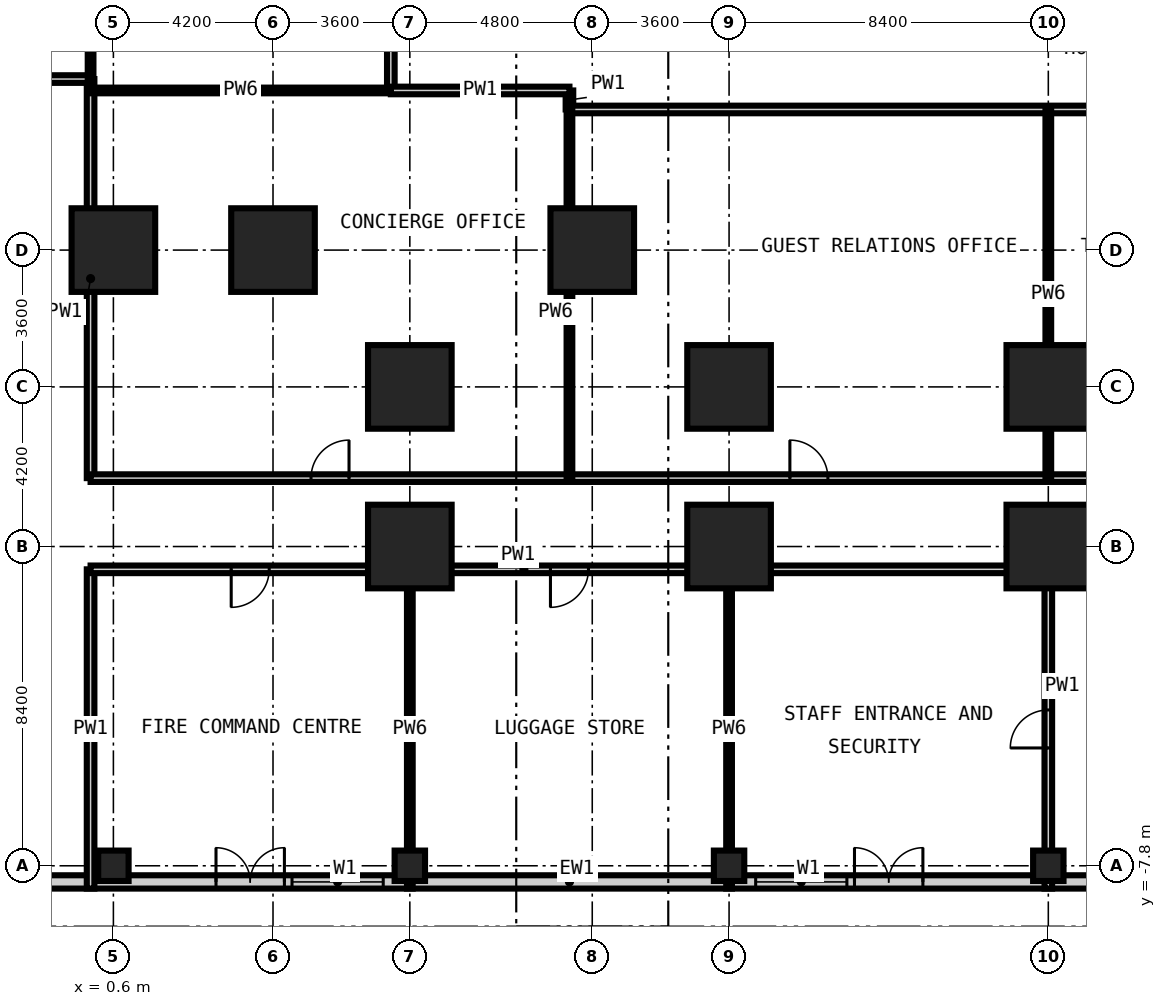
"""IFC4 building model, lengths in metres.
Left out: names, types, materials, properties, quantities, classifications, styles, units other than length and angle.
Written with IfcOpenShell. Run it as: python <this file> out.ifc"""

import sys

from ifc_helpers import new_model, si_unit, direction, frame, frame_2d, origin, origin_with_axes, origin_2d, place, context, subcontext, project, spatial, rectangle, extrude, element, fill, save


model = new_model("IFC4")
c1 = context("Model", 3, precision=1e-05, world=origin(), true_north=direction((0.0, 1.0)))
c2 = subcontext(c1, "Body", "Model", "MODEL_VIEW")
j1 = project(units=[si_unit("LENGTHUNIT", "METRE"), si_unit("PLANEANGLEUNIT", "RADIAN")], contexts=[c1])
p1 = place(None, origin())
s1 = spatial("IfcSite", under=j1, at=p1, CompositionType="ELEMENT")
p2 = place(p1, origin())
s2 = spatial("IfcBuilding", under=s1, at=p2, CompositionType="ELEMENT")
p3 = place(p2, origin())
s3 = spatial("IfcBuildingStorey", under=s2, at=p3, CompositionType="ELEMENT", Elevation=0.0)
for number, where, z_axis, x_axis in (
    (1, (0.6, 8.4, -0.3), (0.0, 0.0, 1.0), (1.0, 0.0, 0.0)),
    (2, (4.8, 8.4, -0.3), (0.0, 0.0, 1.0), (1.0, 0.0, 0.0)),
    (3, (8.4, 0.6, -0.3), (0.0, 0.0, 1.0), (1.0, 0.0, 0.0)),
    (4, (8.4, 4.8, -0.3), (0.0, 0.0, 1.0), (1.0, 0.0, 0.0)),
    (5, (13.2, 8.4, -0.3), (0.0, 0.0, 1.0), (1.0, 0.0, 0.0)),
    (6, (16.8, 0.6, -0.3), (0.0, 0.0, 1.0), (1.0, 0.0, 0.0)),
    (7, (16.8, 4.8, -0.3), (0.0, 0.0, 1.0), (1.0, 0.0, 0.0)),
    (8, (25.2, 0.6, -0.3), (0.0, 0.0, 1.0), (1.0, 0.0, 0.0)),
    (9, (25.2, 4.8, -0.3), (0.0, 0.0, 1.0), (1.0, 0.0, 0.0)),
):
    element("IfcColumn", number, at=place(p3, frame(where, z_axis=z_axis, x_axis=x_axis)), inside=s3, PredefinedType="COLUMN", context=c2, shape_type="SweptSolid", body=[
        extrude(rectangle(XDim=2.2, YDim=2.2, at=origin_2d()), origin(), (0.0, 0.0, 1.0), 6.0),
    ])
for number, where, z_axis, x_axis in (
    (10, (0.6, -7.8, -0.3), (0.0, 0.0, 1.0), (1.0, 0.0, 0.0)),
    (11, (8.4, -7.8, -0.3), (0.0, 0.0, 1.0), (1.0, 0.0, 0.0)),
    (12, (16.8, -7.8, -0.3), (0.0, 0.0, 1.0), (1.0, 0.0, 0.0)),
    (13, (25.2, -7.8, -0.3), (0.0, 0.0, 1.0), (1.0, 0.0, 0.0)),
):
    element("IfcColumn", number, at=place(p3, frame(where, z_axis=z_axis, x_axis=x_axis)), inside=s3, PredefinedType="COLUMN", context=c2, shape_type="SweptSolid", body=[
        extrude(rectangle(XDim=0.8, YDim=0.8, at=origin_2d()), origin(), (0.0, 0.0, 1.0), 6.0),
    ])
p4 = place(p3, frame((-33.6, -8.225, 0.0), z_axis=(0.0, 0.0, 1.0), x_axis=(1.0, 0.0, 0.0)))
e14 = element("IfcWall", 14, at=p4, inside=s3, PredefinedType="SOLIDWALL", context=c2, shape_type="SweptSolid", body=[
    extrude(rectangle(XDim=92.4, YDim=0.35, at=frame_2d((46.2, 0.0))), origin(), (0.0, 0.0, 1.0), 5.7),
])
p5 = place(p4, frame((5.4, 0.0, 0.0)))
e15 = element("IfcOpeningElement", 15, at=p5, cuts=e14, PredefinedType="OPENING", context=c2, shape_type="SweptSolid", body=[
    extrude(rectangle(XDim=1.8, YDim=2.7, at=frame_2d((0.9, 1.35))), frame((0.0, 0.185, 0.0), z_axis=(0.0, -1.0, 0.0), x_axis=(1.0, 0.0, 0.0)), (0.0, 0.0, 1.0), 0.37),
])
p6 = place(p4, frame((2.8, 0.0, 0.9)))
e16 = element("IfcOpeningElement", 16, at=p6, cuts=e14, PredefinedType="OPENING", context=c2, shape_type="SweptSolid", body=[
    extrude(rectangle(XDim=2.4, YDim=2.4, at=frame_2d((1.2, 1.2))), frame((0.0, 0.185, 0.0), z_axis=(0.0, -1.0, 0.0), x_axis=(1.0, 0.0, 0.0)), (0.0, 0.0, 1.0), 0.37),
])
p7 = place(p4, frame((9.3, 0.0, 0.9)))
e17 = element("IfcOpeningElement", 17, at=p7, cuts=e14, PredefinedType="OPENING", context=c2, shape_type="SweptSolid", body=[
    extrude(rectangle(XDim=2.4, YDim=2.4, at=frame_2d((1.2, 1.2))), frame((0.0, 0.185, 0.0), z_axis=(0.0, -1.0, 0.0), x_axis=(1.0, 0.0, 0.0)), (0.0, 0.0, 1.0), 0.37),
])
p8 = place(p4, frame((13.8, 0.0, 0.9)))
e18 = element("IfcOpeningElement", 18, at=p8, cuts=e14, PredefinedType="OPENING", context=c2, shape_type="SweptSolid", body=[
    extrude(rectangle(XDim=2.4, YDim=2.4, at=frame_2d((1.2, 1.2))), frame((0.0, 0.185, 0.0), z_axis=(0.0, -1.0, 0.0), x_axis=(1.0, 0.0, 0.0)), (0.0, 0.0, 1.0), 0.37),
])
p9 = place(p4, frame((19.3, 0.0, 0.0)))
e19 = element("IfcOpeningElement", 19, at=p9, cuts=e14, PredefinedType="OPENING", context=c2, shape_type="SweptSolid", body=[
    extrude(rectangle(XDim=1.2, YDim=2.4, at=frame_2d((0.6, 1.2))), frame((0.0, 0.185, 0.0), z_axis=(0.0, -1.0, 0.0), x_axis=(1.0, 0.0, 0.0)), (0.0, 0.0, 1.0), 0.37),
])
p10 = place(p4, frame((26.8, 0.0, 0.0)))
e20 = element("IfcOpeningElement", 20, at=p10, cuts=e14, PredefinedType="OPENING", context=c2, shape_type="SweptSolid", body=[
    extrude(rectangle(XDim=2.4, YDim=3.0, at=frame_2d((1.2, 1.5))), frame((0.0, 0.185, 0.0), z_axis=(0.0, -1.0, 0.0), x_axis=(1.0, 0.0, 0.0)), (0.0, 0.0, 1.0), 0.37),
])
p11 = place(p4, frame((36.9, 0.0, 0.0)))
e21 = element("IfcOpeningElement", 21, at=p11, cuts=e14, PredefinedType="OPENING", context=c2, shape_type="SweptSolid", body=[
    extrude(rectangle(XDim=1.8, YDim=2.4, at=frame_2d((0.9, 1.2))), frame((0.0, 0.185, 0.0), z_axis=(0.0, -1.0, 0.0), x_axis=(1.0, 0.0, 0.0)), (0.0, 0.0, 1.0), 0.37),
])
p12 = place(p4, frame((38.9, 0.0, 0.9)))
e22 = element("IfcOpeningElement", 22, at=p12, cuts=e14, PredefinedType="OPENING", context=c2, shape_type="SweptSolid", body=[
    extrude(rectangle(XDim=2.4, YDim=2.4, at=frame_2d((1.2, 1.2))), frame((0.0, 0.185, 0.0), z_axis=(0.0, -1.0, 0.0), x_axis=(1.0, 0.0, 0.0)), (0.0, 0.0, 1.0), 0.37),
])
p13 = place(p4, frame((53.7, 0.0, 0.0)))
e23 = element("IfcOpeningElement", 23, at=p13, cuts=e14, PredefinedType="OPENING", context=c2, shape_type="SweptSolid", body=[
    extrude(rectangle(XDim=1.8, YDim=2.4, at=frame_2d((0.9, 1.2))), frame((0.0, 0.185, 0.0), z_axis=(0.0, -1.0, 0.0), x_axis=(1.0, 0.0, 0.0)), (0.0, 0.0, 1.0), 0.37),
])
p14 = place(p4, frame((51.1, 0.0, 0.9)))
e24 = element("IfcOpeningElement", 24, at=p14, cuts=e14, PredefinedType="OPENING", context=c2, shape_type="SweptSolid", body=[
    extrude(rectangle(XDim=2.4, YDim=2.4, at=frame_2d((1.2, 1.2))), frame((0.0, 0.185, 0.0), z_axis=(0.0, -1.0, 0.0), x_axis=(1.0, 0.0, 0.0)), (0.0, 0.0, 1.0), 0.37),
])
p15 = place(p4, frame((61.8, 0.0, 0.0)))
e25 = element("IfcOpeningElement", 25, at=p15, cuts=e14, PredefinedType="OPENING", context=c2, shape_type="SweptSolid", body=[
    extrude(rectangle(XDim=2.4, YDim=3.0, at=frame_2d((1.2, 1.5))), frame((0.0, 0.185, 0.0), z_axis=(0.0, -1.0, 0.0), x_axis=(1.0, 0.0, 0.0)), (0.0, 0.0, 1.0), 0.37),
])
p16 = place(p4, frame((72.7, 0.0, 0.9)))
e26 = element("IfcOpeningElement", 26, at=p16, cuts=e14, PredefinedType="OPENING", context=c2, shape_type="SweptSolid", body=[
    extrude(rectangle(XDim=2.4, YDim=2.4, at=frame_2d((1.2, 1.2))), frame((0.0, 0.185, 0.0), z_axis=(0.0, -1.0, 0.0), x_axis=(1.0, 0.0, 0.0)), (0.0, 0.0, 1.0), 0.37),
])
p17 = place(p4, frame((81.1, 0.0, 0.9)))
e27 = element("IfcOpeningElement", 27, at=p17, cuts=e14, PredefinedType="OPENING", context=c2, shape_type="SweptSolid", body=[
    extrude(rectangle(XDim=2.4, YDim=2.4, at=frame_2d((1.2, 1.2))), frame((0.0, 0.185, 0.0), z_axis=(0.0, -1.0, 0.0), x_axis=(1.0, 0.0, 0.0)), (0.0, 0.0, 1.0), 0.37),
])
p18 = place(p4, frame((88.9, 0.0, 0.9)))
e28 = element("IfcOpeningElement", 28, at=p18, cuts=e14, PredefinedType="OPENING", context=c2, shape_type="SweptSolid", body=[
    extrude(rectangle(XDim=2.4, YDim=2.4, at=frame_2d((1.2, 1.2))), frame((0.0, 0.185, 0.0), z_axis=(0.0, -1.0, 0.0), x_axis=(1.0, 0.0, 0.0)), (0.0, 0.0, 1.0), 0.37),
])
p19 = place(p3, frame((0.0, -8.4, 0.0), z_axis=(0.0, 0.0, 1.0), x_axis=(0.0, 1.0, 0.0)))
e29 = element("IfcWall", 29, at=p19, inside=s3, PredefinedType="PARTITIONING", context=c2, shape_type="SweptSolid", body=[
    extrude(rectangle(XDim=8.4, YDim=0.2, at=frame_2d((4.2, 0.0))), origin(), (0.0, 0.0, 1.0), 5.7),
])
p20 = place(p3, frame((0.0, 2.4, 0.0), z_axis=(0.0, 0.0, 1.0), x_axis=(0.0, 1.0, 0.0)))
e30 = element("IfcWall", 30, at=p20, inside=s3, PredefinedType="PARTITIONING", context=c2, shape_type="SweptSolid", body=[
    extrude(rectangle(XDim=10.5, YDim=0.2, at=frame_2d((5.25, 0.0))), origin(), (0.0, 0.0, 1.0), 5.7),
])
p21 = place(p3, frame((7.9, 12.6, 0.0), z_axis=(0.0, 0.0, 1.0), x_axis=(0.0, 1.0, 0.0)))
e31 = element("IfcWall", 31, at=p21, inside=s3, PredefinedType="PARTITIONING", context=c2, shape_type="SweptSolid", body=[
    extrude(rectangle(XDim=8.4, YDim=0.2, at=frame_2d((4.2, 0.0))), origin(), (0.0, 0.0, 1.0), 5.7),
])
p22 = place(p21, frame((3.3, 0.0, 0.0)))
e32 = element("IfcOpeningElement", 32, at=p22, cuts=e31, PredefinedType="OPENING", context=c2, shape_type="SweptSolid", body=[
    extrude(rectangle(XDim=1.8, YDim=2.4, at=frame_2d((0.9, 1.2))), frame((0.0, 0.11, 0.0), z_axis=(0.0, -1.0, 0.0), x_axis=(1.0, 0.0, 0.0)), (0.0, 0.0, 1.0), 0.22),
])
p23 = place(p3, frame((12.6, 12.1, 0.0), z_axis=(0.0, 0.0, 1.0), x_axis=(0.0, 1.0, 0.0)))
e33 = element("IfcWall", 33, at=p23, inside=s3, PredefinedType="PARTITIONING", context=c2, shape_type="SweptSolid", body=[
    extrude(rectangle(XDim=0.5, YDim=0.2, at=frame_2d((0.25, 0.0))), origin(), (0.0, 0.0, 1.0), 5.7),
])
p24 = place(p3, frame((25.2, -8.4, 0.0), z_axis=(0.0, 0.0, 1.0), x_axis=(0.0, 1.0, 0.0)))
e34 = element("IfcWall", 34, at=p24, inside=s3, PredefinedType="PARTITIONING", context=c2, shape_type="SweptSolid", body=[
    extrude(rectangle(XDim=8.4, YDim=0.2, at=frame_2d((4.2, 0.0))), origin(), (0.0, 0.0, 1.0), 5.7),
])
p25 = place(p24, frame((3.7, 0.0, 0.0)))
e35 = element("IfcOpeningElement", 35, at=p25, cuts=e34, PredefinedType="OPENING", context=c2, shape_type="SweptSolid", body=[
    extrude(rectangle(XDim=1.0, YDim=2.1, at=frame_2d((0.5, 1.05))), frame((0.0, 0.11, 0.0), z_axis=(0.0, -1.0, 0.0), x_axis=(1.0, 0.0, 0.0)), (0.0, 0.0, 1.0), 0.22),
])
p26 = place(p3, origin_with_axes())
e36 = element("IfcWall", 36, at=p26, inside=s3, PredefinedType="PARTITIONING", context=c2, shape_type="SweptSolid", body=[
    extrude(rectangle(XDim=25.2, YDim=0.2, at=frame_2d((12.6, 0.0))), origin(), (0.0, 0.0, 1.0), 5.7),
])
p27 = place(p26, frame((3.7, 0.0, 0.0)))
e37 = element("IfcOpeningElement", 37, at=p27, cuts=e36, PredefinedType="OPENING", context=c2, shape_type="SweptSolid", body=[
    extrude(rectangle(XDim=1.0, YDim=2.1, at=frame_2d((0.5, 1.05))), frame((0.0, 0.11, 0.0), z_axis=(0.0, -1.0, 0.0), x_axis=(1.0, 0.0, 0.0)), (0.0, 0.0, 1.0), 0.22),
])
p28 = place(p26, frame((12.1, 0.0, 0.0)))
e38 = element("IfcOpeningElement", 38, at=p28, cuts=e36, PredefinedType="OPENING", context=c2, shape_type="SweptSolid", body=[
    extrude(rectangle(XDim=1.0, YDim=2.1, at=frame_2d((0.5, 1.05))), frame((0.0, 0.11, 0.0), z_axis=(0.0, -1.0, 0.0), x_axis=(1.0, 0.0, 0.0)), (0.0, 0.0, 1.0), 0.22),
])
p29 = place(p3, frame((0.0, 2.4, 0.0), z_axis=(0.0, 0.0, 1.0), x_axis=(1.0, 0.0, 0.0)))
e39 = element("IfcWall", 39, at=p29, inside=s3, PredefinedType="PARTITIONING", context=c2, shape_type="SweptSolid", body=[
    extrude(rectangle(XDim=54.6, YDim=0.2, at=frame_2d((27.3, 0.0))), origin(), (0.0, 0.0, 1.0), 5.7),
])
p30 = place(p29, frame((5.8, 0.0, 0.0)))
e40 = element("IfcOpeningElement", 40, at=p30, cuts=e39, PredefinedType="OPENING", context=c2, shape_type="SweptSolid", body=[
    extrude(rectangle(XDim=1.0, YDim=2.1, at=frame_2d((0.5, 1.05))), frame((0.0, 0.11, 0.0), z_axis=(0.0, -1.0, 0.0), x_axis=(1.0, 0.0, 0.0)), (0.0, 0.0, 1.0), 0.22),
])
p31 = place(p29, frame((18.4, 0.0, 0.0)))
e41 = element("IfcOpeningElement", 41, at=p31, cuts=e39, PredefinedType="OPENING", context=c2, shape_type="SweptSolid", body=[
    extrude(rectangle(XDim=1.0, YDim=2.1, at=frame_2d((0.5, 1.05))), frame((0.0, 0.11, 0.0), z_axis=(0.0, -1.0, 0.0), x_axis=(1.0, 0.0, 0.0)), (0.0, 0.0, 1.0), 0.22),
])
p32 = place(p29, frame((28.9, 0.0, 0.0)))
e42 = element("IfcOpeningElement", 42, at=p32, cuts=e39, PredefinedType="OPENING", context=c2, shape_type="SweptSolid", body=[
    extrude(rectangle(XDim=1.0, YDim=2.1, at=frame_2d((0.5, 1.05))), frame((0.0, 0.11, 0.0), z_axis=(0.0, -1.0, 0.0), x_axis=(1.0, 0.0, 0.0)), (0.0, 0.0, 1.0), 0.22),
])
p33 = place(p29, frame((37.3, 0.0, 0.0)))
e43 = element("IfcOpeningElement", 43, at=p33, cuts=e39, PredefinedType="OPENING", context=c2, shape_type="SweptSolid", body=[
    extrude(rectangle(XDim=1.0, YDim=2.1, at=frame_2d((0.5, 1.05))), frame((0.0, 0.11, 0.0), z_axis=(0.0, -1.0, 0.0), x_axis=(1.0, 0.0, 0.0)), (0.0, 0.0, 1.0), 0.22),
])
p34 = place(p3, frame((12.6, 12.1, 0.0), z_axis=(0.0, 0.0, 1.0), x_axis=(1.0, 0.0, 0.0)))
e44 = element("IfcWall", 44, at=p34, inside=s3, PredefinedType="PARTITIONING", context=c2, shape_type="SweptSolid", body=[
    extrude(rectangle(XDim=33.6, YDim=0.2, at=frame_2d((16.8, 0.0))), origin(), (0.0, 0.0, 1.0), 5.7),
])
p35 = place(p3, frame((7.9, 12.6, 0.0), z_axis=(0.0, 0.0, 1.0), x_axis=(1.0, 0.0, 0.0)))
e45 = element("IfcWall", 45, at=p35, inside=s3, PredefinedType="PARTITIONING", context=c2, shape_type="SweptSolid", body=[
    extrude(rectangle(XDim=4.7, YDim=0.2, at=frame_2d((2.35, 0.0))), origin(), (0.0, 0.0, 1.0), 5.7),
])
p36 = place(p3, frame((0.0, 12.9, 0.0), z_axis=(0.0, 0.0, 1.0), x_axis=(-1.0, 0.0, 0.0)))
e46 = element("IfcWall", 46, at=p36, inside=s3, PredefinedType="PARTITIONING", context=c2, shape_type="SweptSolid", body=[
    extrude(rectangle(XDim=11.2, YDim=0.2, at=frame_2d((5.6, 0.0))), origin(), (0.0, 0.0, 1.0), 5.7),
])
p37 = place(p3, frame((0.0, 12.9, 0.0), z_axis=(0.0, 0.0, 1.0), x_axis=(0.0, 1.0, 0.0)))
e47 = element("IfcWall", 47, at=p37, inside=s3, PredefinedType="PARTITIONING", context=c2, shape_type="SweptSolid", body=[
    extrude(rectangle(XDim=33.0, YDim=0.15, at=frame_2d((16.5, 0.0))), origin(), (0.0, 0.0, 1.0), 5.7),
])
p38 = place(p3, frame((8.4, -8.4, 0.0), z_axis=(0.0, 0.0, 1.0), x_axis=(0.0, 1.0, 0.0)))
e48 = element("IfcWall", 48, at=p38, inside=s3, PredefinedType="PARTITIONING", context=c2, shape_type="SweptSolid", body=[
    extrude(rectangle(XDim=8.4, YDim=0.15, at=frame_2d((4.2, 0.0))), origin(), (0.0, 0.0, 1.0), 5.7),
])
p39 = place(p3, frame((12.6, 2.4, 0.0), z_axis=(0.0, 0.0, 1.0), x_axis=(0.0, 1.0, 0.0)))
e49 = element("IfcWall", 49, at=p39, inside=s3, PredefinedType="PARTITIONING", context=c2, shape_type="SweptSolid", body=[
    extrude(rectangle(XDim=9.7, YDim=0.15, at=frame_2d((4.85, 0.0))), origin(), (0.0, 0.0, 1.0), 5.7),
])
p40 = place(p3, frame((16.8, -8.4, 0.0), z_axis=(0.0, 0.0, 1.0), x_axis=(0.0, 1.0, 0.0)))
e50 = element("IfcWall", 50, at=p40, inside=s3, PredefinedType="PARTITIONING", context=c2, shape_type="SweptSolid", body=[
    extrude(rectangle(XDim=8.4, YDim=0.15, at=frame_2d((4.2, 0.0))), origin(), (0.0, 0.0, 1.0), 5.7),
])
p41 = place(p3, frame((25.2, 2.4, 0.0), z_axis=(0.0, 0.0, 1.0), x_axis=(0.0, 1.0, 0.0)))
e51 = element("IfcWall", 51, at=p41, inside=s3, PredefinedType="PARTITIONING", context=c2, shape_type="SweptSolid", body=[
    extrude(rectangle(XDim=9.7, YDim=0.15, at=frame_2d((4.85, 0.0))), origin(), (0.0, 0.0, 1.0), 5.7),
])
p42 = place(p3, frame((0.0, 12.6, 0.0), z_axis=(0.0, 0.0, 1.0), x_axis=(1.0, 0.0, 0.0)))
e52 = element("IfcWall", 52, at=p42, inside=s3, PredefinedType="PARTITIONING", context=c2, shape_type="SweptSolid", body=[
    extrude(rectangle(XDim=7.9, YDim=0.15, at=frame_2d((3.95, 0.0))), origin(), (0.0, 0.0, 1.0), 5.7),
])
p43 = place(p11, origin())
e53 = element("IfcDoor", 53, at=p43, inside=s3, OperationType="DOUBLE_DOOR_DOUBLE_SWING", PredefinedType="DOOR", context=c2, shape_type="SweptSolid", body=[
    extrude(rectangle(XDim=1.8, YDim=2.4, at=frame_2d((0.9, 1.2))), frame((0.0, 0.025, 0.0), z_axis=(0.0, -1.0, 0.0), x_axis=(1.0, 0.0, 0.0)), (0.0, 0.0, 1.0), 0.05),
])
fill(e21, e53)
p44 = place(p12, origin())
e54 = element("IfcWindow", 54, at=p44, inside=s3, PartitioningType="SINGLE_PANEL", PredefinedType="WINDOW", context=c2, shape_type="SweptSolid", body=[
    extrude(rectangle(XDim=2.4, YDim=2.4, at=frame_2d((1.2, 1.2))), frame((0.0, 0.03, 0.0), z_axis=(0.0, -1.0, 0.0), x_axis=(1.0, 0.0, 0.0)), (0.0, 0.0, 1.0), 0.06),
])
fill(e22, e54)
p45 = place(p13, origin())
e55 = element("IfcDoor", 55, at=p45, inside=s3, OperationType="DOUBLE_DOOR_DOUBLE_SWING", PredefinedType="DOOR", context=c2, shape_type="SweptSolid", body=[
    extrude(rectangle(XDim=1.8, YDim=2.4, at=frame_2d((0.9, 1.2))), frame((0.0, 0.025, 0.0), z_axis=(0.0, -1.0, 0.0), x_axis=(1.0, 0.0, 0.0)), (0.0, 0.0, 1.0), 0.05),
])
fill(e23, e55)
p46 = place(p14, origin())
e56 = element("IfcWindow", 56, at=p46, inside=s3, PartitioningType="SINGLE_PANEL", PredefinedType="WINDOW", context=c2, shape_type="SweptSolid", body=[
    extrude(rectangle(XDim=2.4, YDim=2.4, at=frame_2d((1.2, 1.2))), frame((0.0, 0.03, 0.0), z_axis=(0.0, -1.0, 0.0), x_axis=(1.0, 0.0, 0.0)), (0.0, 0.0, 1.0), 0.06),
])
fill(e24, e56)
p47 = place(p27, frame((1.0, 0.0, 0.0), z_axis=(0.0, 0.0, 1.0), x_axis=(-1.0, 0.0, 0.0)))
e57 = element("IfcDoor", 57, at=p47, inside=s3, OperationType="SINGLE_SWING_RIGHT", PredefinedType="DOOR", context=c2, shape_type="SweptSolid", body=[
    extrude(rectangle(XDim=1.0, YDim=2.1, at=frame_2d((0.5, 1.05))), frame((0.0, 0.025, 0.0), z_axis=(0.0, -1.0, 0.0), x_axis=(1.0, 0.0, 0.0)), (0.0, 0.0, 1.0), 0.05),
])
fill(e37, e57)
p48 = place(p28, frame((1.0, 0.0, 0.0), z_axis=(0.0, 0.0, 1.0), x_axis=(-1.0, 0.0, 0.0)))
e58 = element("IfcDoor", 58, at=p48, inside=s3, OperationType="SINGLE_SWING_RIGHT", PredefinedType="DOOR", context=c2, shape_type="SweptSolid", body=[
    extrude(rectangle(XDim=1.0, YDim=2.1, at=frame_2d((0.5, 1.05))), frame((0.0, 0.025, 0.0), z_axis=(0.0, -1.0, 0.0), x_axis=(1.0, 0.0, 0.0)), (0.0, 0.0, 1.0), 0.05),
])
fill(e38, e58)
p49 = place(p25, origin())
e59 = element("IfcDoor", 59, at=p49, inside=s3, OperationType="SINGLE_SWING_LEFT", PredefinedType="DOOR", context=c2, shape_type="SweptSolid", body=[
    extrude(rectangle(XDim=1.0, YDim=2.1, at=frame_2d((0.5, 1.05))), frame((0.0, 0.025, 0.0), z_axis=(0.0, -1.0, 0.0), x_axis=(1.0, 0.0, 0.0)), (0.0, 0.0, 1.0), 0.05),
])
fill(e35, e59)
p50 = place(p30, origin())
e60 = element("IfcDoor", 60, at=p50, inside=s3, OperationType="SINGLE_SWING_RIGHT", PredefinedType="DOOR", context=c2, shape_type="SweptSolid", body=[
    extrude(rectangle(XDim=1.0, YDim=2.1, at=frame_2d((0.5, 1.05))), frame((0.0, 0.025, 0.0), z_axis=(0.0, -1.0, 0.0), x_axis=(1.0, 0.0, 0.0)), (0.0, 0.0, 1.0), 0.05),
])
fill(e40, e60)
p51 = place(p31, origin())
e61 = element("IfcDoor", 61, at=p51, inside=s3, OperationType="SINGLE_SWING_LEFT", PredefinedType="DOOR", context=c2, shape_type="SweptSolid", body=[
    extrude(rectangle(XDim=1.0, YDim=2.1, at=frame_2d((0.5, 1.05))), frame((0.0, 0.025, 0.0), z_axis=(0.0, -1.0, 0.0), x_axis=(1.0, 0.0, 0.0)), (0.0, 0.0, 1.0), 0.05),
])
fill(e41, e61)
save(model, sys.argv[1])
